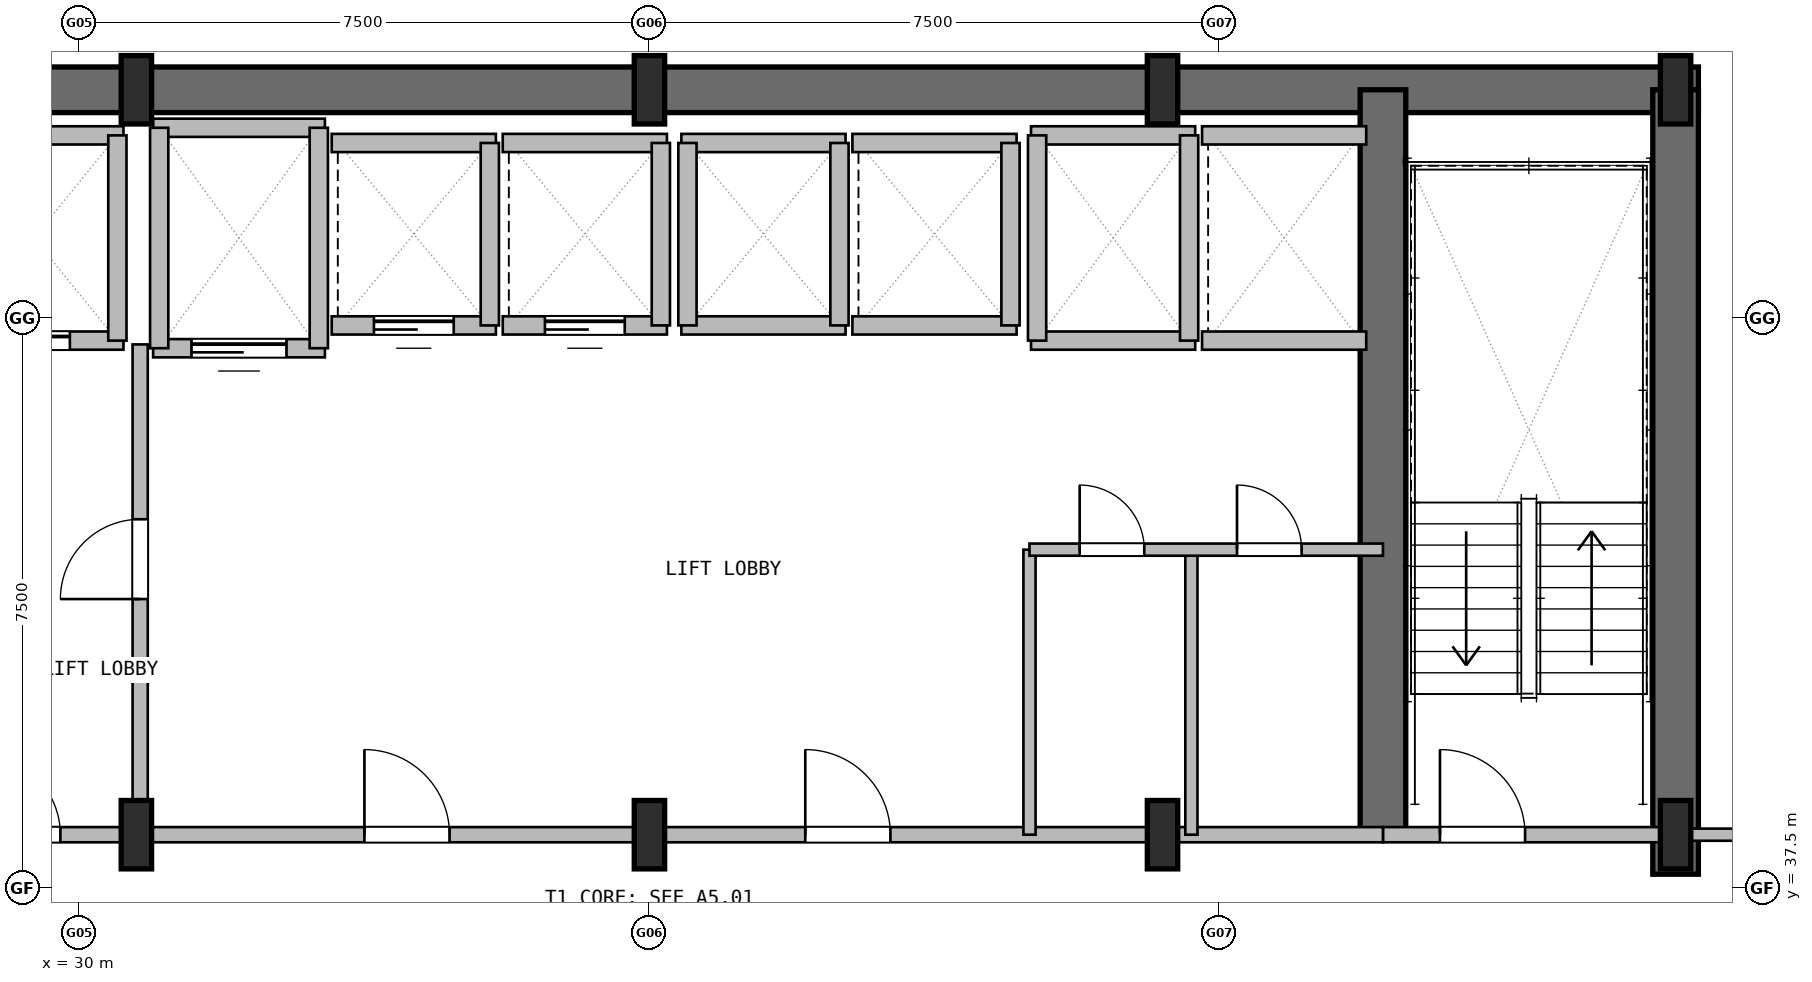
"""IFC4 building model, lengths in metres.
Left out: names, types, materials, properties, quantities, classifications, styles, units other than length and angle.
Written with IfcOpenShell. Run it as: python <this file> out.ifc"""

import sys

from ifc_helpers import new_model, si_unit, direction, frame, frame_2d, origin, origin_2d, place, context, subcontext, project, spatial, rectangle, i_section, extrude, element, fill, save


model = new_model("IFC4")
c1 = context("Model", 3, precision=1e-05, world=origin(), true_north=direction((0.0, 1.0)))
c2 = subcontext(c1, "Body", "Model", "MODEL_VIEW")
j1 = project(units=[si_unit("LENGTHUNIT", "METRE"), si_unit("PLANEANGLEUNIT", "RADIAN")], contexts=[c1])
p1 = place(None, origin())
s1 = spatial("IfcSite", under=j1, at=p1, CompositionType="ELEMENT")
p2 = place(p1, origin())
s2 = spatial("IfcBuilding", under=s1, at=p2, CompositionType="ELEMENT")
p3 = place(p2, frame((0.0, 0.0, 57.0)))
s3 = spatial("IfcBuildingStorey", under=s2, at=p3, CompositionType="ELEMENT", Elevation=57.0)
p4 = place(p3, frame((23.7, 48.0, 0.0), z_axis=(0.0, 0.0, 1.0), x_axis=(1.0, 0.0, 0.0)))
e1 = element("IfcWall", 1, at=p4, inside=s3, PredefinedType="SHEAR", context=c2, shape_type="SweptSolid", body=[
    extrude(rectangle(XDim=27.6, YDim=0.6, at=frame_2d((13.8, 0.0))), origin(), (0.0, 0.0, 1.0), 3.3),
])
p5 = place(p3, frame((51.0, 37.68, 0.0), z_axis=(0.0, 0.0, 1.0), x_axis=(0.0, 1.0, 0.0)))
e2 = element("IfcWall", 2, at=p5, inside=s3, PredefinedType="SHEAR", context=c2, shape_type="SweptSolid", body=[
    extrude(rectangle(XDim=10.32, YDim=0.6, at=frame_2d((5.16, 0.0))), origin(), (0.0, 0.0, 1.0), 3.3),
])
p6 = place(p3, frame((47.15, 38.2, 0.0), z_axis=(0.0, 0.0, 1.0), x_axis=(0.0, 1.0, 0.0)))
e3 = element("IfcWall", 3, at=p6, inside=s3, PredefinedType="SHEAR", context=c2, shape_type="SweptSolid", body=[
    extrude(rectangle(XDim=9.8, YDim=0.6, at=frame_2d((4.9, 0.0))), origin(), (0.0, 0.0, 1.0), 3.3),
])
for number, where, z_axis, x_axis in (
    (4, (30.75, 38.2, 0.0), (0.0, 0.0, 1.0), (1.0, 0.0, 0.0)),
    (5, (30.75, 48.0, 0.0), (0.0, 0.0, 1.0), (1.0, 0.0, 0.0)),
    (6, (37.5, 38.2, 0.0), (0.0, 0.0, 1.0), (1.0, 0.0, 0.0)),
    (7, (37.5, 48.0, 0.0), (0.0, 0.0, 1.0), (1.0, 0.0, 0.0)),
    (8, (44.25, 38.2, 0.0), (0.0, 0.0, 1.0), (1.0, 0.0, 0.0)),
    (9, (44.25, 48.0, 0.0), (0.0, 0.0, 1.0), (1.0, 0.0, 0.0)),
    (10, (51.0, 38.2, 0.0), (0.0, 0.0, 1.0), (1.0, 0.0, 0.0)),
    (11, (51.0, 48.0, 0.0), (0.0, 0.0, 1.0), (1.0, 0.0, 0.0)),
):
    element("IfcColumn", number, at=place(p3, frame(where, z_axis=z_axis, x_axis=x_axis)), inside=s3, PredefinedType="COLUMN", context=c2, shape_type="SweptSolid", body=[
        extrude(i_section(OverallWidth=0.4, OverallDepth=0.9, WebThickness=0.02, FlangeThickness=0.036, at=origin_2d()), origin(), (0.0, 0.0, 1.0), 3.3),
    ])
p7 = place(p3, frame((47.15, 38.2, 0.0), z_axis=(0.0, 0.0, 1.0), x_axis=(1.0, 0.0, 0.0)))
e12 = element("IfcWall", 12, at=p7, inside=s3, PredefinedType="PARTITIONING", context=c2, shape_type="SweptSolid", body=[
    extrude(rectangle(XDim=3.85, YDim=0.2, at=frame_2d((1.925, 0.0))), origin(), (0.0, 0.0, 1.0), 2.33),
])
p8 = place(p7, frame((0.75, 0.0, 0.0)))
e13 = element("IfcOpeningElement", 13, at=p8, cuts=e12, PredefinedType="OPENING", context=c2, shape_type="SweptSolid", body=[
    extrude(rectangle(XDim=1.12, YDim=2.1, at=frame_2d((0.56, 1.05))), frame((0.0, 0.11, 0.0), z_axis=(0.0, -1.0, 0.0), x_axis=(1.0, 0.0, 0.0)), (0.0, 0.0, 1.0), 0.22),
])
p9 = place(p3, frame((30.8, 38.2, 0.0), z_axis=(0.0, 0.0, 1.0), x_axis=(0.0, 1.0, 0.0)))
e14 = element("IfcWall", 14, at=p9, inside=s3, PredefinedType="PARTITIONING", context=c2, shape_type="SweptSolid", body=[
    extrude(rectangle(XDim=6.45, YDim=0.2, at=frame_2d((3.225, 0.0))), origin(), (0.0, 0.0, 1.0), 2.33),
])
p10 = place(p9, frame((3.1, 0.0, 0.0)))
e15 = element("IfcOpeningElement", 15, at=p10, cuts=e14, PredefinedType="OPENING", context=c2, shape_type="SweptSolid", body=[
    extrude(rectangle(XDim=1.05, YDim=2.1, at=frame_2d((0.525, 1.05))), frame((0.0, 0.11, 0.0), z_axis=(0.0, -1.0, 0.0), x_axis=(1.0, 0.0, 0.0)), (0.0, 0.0, 1.0), 0.22),
])
p11 = place(p3, frame((27.95, 38.2, 0.0), z_axis=(0.0, 0.0, 1.0), x_axis=(1.0, 0.0, 0.0)))
e16 = element("IfcWall", 16, at=p11, inside=s3, PredefinedType="PARTITIONING", context=c2, shape_type="SweptSolid", body=[
    extrude(rectangle(XDim=2.85, YDim=0.2, at=frame_2d((1.425, 0.0))), origin(), (0.0, 0.0, 1.0), 2.33),
])
p12 = place(p11, frame((0.75, 0.0, 0.0)))
e17 = element("IfcOpeningElement", 17, at=p12, cuts=e16, PredefinedType="OPENING", context=c2, shape_type="SweptSolid", body=[
    extrude(rectangle(XDim=1.05, YDim=2.1, at=frame_2d((0.525, 1.05))), frame((0.0, 0.11, 0.0), z_axis=(0.0, -1.0, 0.0), x_axis=(1.0, 0.0, 0.0)), (0.0, 0.0, 1.0), 0.22),
])
p13 = place(p3, frame((30.8, 38.2, 0.0), z_axis=(0.0, 0.0, 1.0), x_axis=(1.0, 0.0, 0.0)))
e18 = element("IfcWall", 18, at=p13, inside=s3, PredefinedType="PARTITIONING", context=c2, shape_type="SweptSolid", body=[
    extrude(rectangle(XDim=16.35, YDim=0.2, at=frame_2d((8.175, 0.0))), origin(), (0.0, 0.0, 1.0), 2.33),
])
p14 = place(p13, frame((2.95, 0.0, 0.0)))
e19 = element("IfcOpeningElement", 19, at=p14, cuts=e18, PredefinedType="OPENING", context=c2, shape_type="SweptSolid", body=[
    extrude(rectangle(XDim=1.12, YDim=2.1, at=frame_2d((0.56, 1.05))), frame((0.0, 0.11, 0.0), z_axis=(0.0, -1.0, 0.0), x_axis=(1.0, 0.0, 0.0)), (0.0, 0.0, 1.0), 0.22),
])
p15 = place(p13, frame((8.75, 0.0, 0.0)))
e20 = element("IfcOpeningElement", 20, at=p15, cuts=e18, PredefinedType="OPENING", context=c2, shape_type="SweptSolid", body=[
    extrude(rectangle(XDim=1.12, YDim=2.1, at=frame_2d((0.56, 1.05))), frame((0.0, 0.11, 0.0), z_axis=(0.0, -1.0, 0.0), x_axis=(1.0, 0.0, 0.0)), (0.0, 0.0, 1.0), 0.22),
])
p16 = place(p3, frame((28.22, 44.7, 0.0), z_axis=(0.0, 0.0, 1.0), x_axis=(1.0, 0.0, 0.0)))
e21 = element("IfcWall", 21, at=p16, inside=s3, PredefinedType="PARTITIONING", context=c2, shape_type="SweptSolid", body=[
    extrude(rectangle(XDim=2.36, YDim=0.24, at=frame_2d((1.18, 0.0))), origin(), (0.0, 0.0, 1.0), 3.03),
])
p17 = place(p16, frame((0.705, 0.0, 0.0)))
e22 = element("IfcOpeningElement", 22, at=p17, cuts=e21, PredefinedType="OPENING", context=c2, shape_type="SweptSolid", body=[
    extrude(rectangle(XDim=0.95, YDim=2.15, at=frame_2d((0.475, 1.075))), frame((0.0, 0.13, 0.0), z_axis=(0.0, -1.0, 0.0), x_axis=(1.0, 0.0, 0.0)), (0.0, 0.0, 1.0), 0.26),
])
p18 = place(p3, frame((28.22, 47.4, 0.0), z_axis=(0.0, 0.0, 1.0), x_axis=(1.0, 0.0, 0.0)))
e23 = element("IfcWall", 23, at=p18, inside=s3, PredefinedType="PARTITIONING", context=c2, shape_type="SweptSolid", body=[
    extrude(rectangle(XDim=2.36, YDim=0.24, at=frame_2d((1.18, 0.0))), origin(), (0.0, 0.0, 1.0), 3.03),
])
p19 = place(p3, frame((30.5, 44.7, 0.0), z_axis=(0.0, 0.0, 1.0), x_axis=(0.0, 1.0, 0.0)))
e24 = element("IfcWall", 24, at=p19, inside=s3, PredefinedType="PARTITIONING", context=c2, shape_type="SweptSolid", body=[
    extrude(rectangle(XDim=2.7, YDim=0.24, at=frame_2d((1.35, 0.0))), origin(), (0.0, 0.0, 1.0), 2.33),
])
p20 = place(p3, frame((30.97, 44.6, 0.0), z_axis=(0.0, 0.0, 1.0), x_axis=(1.0, 0.0, 0.0)))
e25 = element("IfcWall", 25, at=p20, inside=s3, PredefinedType="PARTITIONING", context=c2, shape_type="SweptSolid", body=[
    extrude(rectangle(XDim=2.26, YDim=0.24, at=frame_2d((1.13, 0.0))), origin(), (0.0, 0.0, 1.0), 3.03),
])
p21 = place(p20, frame((0.505, 0.0, 0.0)))
e26 = element("IfcOpeningElement", 26, at=p21, cuts=e25, PredefinedType="OPENING", context=c2, shape_type="SweptSolid", body=[
    extrude(rectangle(XDim=1.25, YDim=2.2, at=frame_2d((0.625, 1.1))), frame((0.0, 0.13, 0.0), z_axis=(0.0, -1.0, 0.0), x_axis=(1.0, 0.0, 0.0)), (0.0, 0.0, 1.0), 0.26),
])
p22 = place(p3, frame((30.97, 47.5, 0.0), z_axis=(0.0, 0.0, 1.0), x_axis=(1.0, 0.0, 0.0)))
e27 = element("IfcWall", 27, at=p22, inside=s3, PredefinedType="PARTITIONING", context=c2, shape_type="SweptSolid", body=[
    extrude(rectangle(XDim=2.26, YDim=0.24, at=frame_2d((1.13, 0.0))), origin(), (0.0, 0.0, 1.0), 3.03),
])
for number, where, z_axis, x_axis in (
    (28, (31.05, 44.6, 0.0), (0.0, 0.0, 1.0), (0.0, 1.0, 0.0)),
    (29, (33.15, 44.6, 0.0), (0.0, 0.0, 1.0), (0.0, 1.0, 0.0)),
):
    element("IfcWall", number, at=place(p3, frame(where, z_axis=z_axis, x_axis=x_axis)), inside=s3, PredefinedType="PARTITIONING", context=c2, shape_type="SweptSolid", body=[
        extrude(rectangle(XDim=2.9, YDim=0.24, at=frame_2d((1.45, 0.0))), origin(), (0.0, 0.0, 1.0), 3.03),
    ])
p23 = place(p3, frame((33.32, 44.9, 0.0), z_axis=(0.0, 0.0, 1.0), x_axis=(1.0, 0.0, 0.0)))
e30 = element("IfcWall", 30, at=p23, inside=s3, PredefinedType="PARTITIONING", context=c2, shape_type="SweptSolid", body=[
    extrude(rectangle(XDim=2.16, YDim=0.24, at=frame_2d((1.08, 0.0))), origin(), (0.0, 0.0, 1.0), 3.03),
])
p24 = place(p23, frame((0.555, 0.0, 0.0)))
e31 = element("IfcOpeningElement", 31, at=p24, cuts=e30, PredefinedType="OPENING", context=c2, shape_type="SweptSolid", body=[
    extrude(rectangle(XDim=1.05, YDim=2.15, at=frame_2d((0.525, 1.075))), frame((0.0, 0.13, 0.0), z_axis=(0.0, -1.0, 0.0), x_axis=(1.0, 0.0, 0.0)), (0.0, 0.0, 1.0), 0.26),
])
p25 = place(p3, frame((33.32, 47.3, 0.0), z_axis=(0.0, 0.0, 1.0), x_axis=(1.0, 0.0, 0.0)))
e32 = element("IfcWall", 32, at=p25, inside=s3, PredefinedType="PARTITIONING", context=c2, shape_type="SweptSolid", body=[
    extrude(rectangle(XDim=2.16, YDim=0.24, at=frame_2d((1.08, 0.0))), origin(), (0.0, 0.0, 1.0), 3.03),
])
p26 = place(p3, frame((35.4, 44.9, 0.0), z_axis=(0.0, 0.0, 1.0), x_axis=(0.0, 1.0, 0.0)))
e33 = element("IfcWall", 33, at=p26, inside=s3, PredefinedType="PARTITIONING", context=c2, shape_type="SweptSolid", body=[
    extrude(rectangle(XDim=2.4, YDim=0.24, at=frame_2d((1.2, 0.0))), origin(), (0.0, 0.0, 1.0), 3.03),
])
p27 = place(p3, frame((35.57, 44.9, 0.0), z_axis=(0.0, 0.0, 1.0), x_axis=(1.0, 0.0, 0.0)))
e34 = element("IfcWall", 34, at=p27, inside=s3, PredefinedType="PARTITIONING", context=c2, shape_type="SweptSolid", body=[
    extrude(rectangle(XDim=2.16, YDim=0.24, at=frame_2d((1.08, 0.0))), origin(), (0.0, 0.0, 1.0), 3.03),
])
p28 = place(p27, frame((0.555, 0.0, 0.0)))
e35 = element("IfcOpeningElement", 35, at=p28, cuts=e34, PredefinedType="OPENING", context=c2, shape_type="SweptSolid", body=[
    extrude(rectangle(XDim=1.05, YDim=2.15, at=frame_2d((0.525, 1.075))), frame((0.0, 0.13, 0.0), z_axis=(0.0, -1.0, 0.0), x_axis=(1.0, 0.0, 0.0)), (0.0, 0.0, 1.0), 0.26),
])
p29 = place(p3, frame((35.57, 47.3, 0.0), z_axis=(0.0, 0.0, 1.0), x_axis=(1.0, 0.0, 0.0)))
e36 = element("IfcWall", 36, at=p29, inside=s3, PredefinedType="PARTITIONING", context=c2, shape_type="SweptSolid", body=[
    extrude(rectangle(XDim=2.16, YDim=0.24, at=frame_2d((1.08, 0.0))), origin(), (0.0, 0.0, 1.0), 3.03),
])
p30 = place(p3, frame((37.65, 44.9, 0.0), z_axis=(0.0, 0.0, 1.0), x_axis=(0.0, 1.0, 0.0)))
e37 = element("IfcWall", 37, at=p30, inside=s3, PredefinedType="PARTITIONING", context=c2, shape_type="SweptSolid", body=[
    extrude(rectangle(XDim=2.4, YDim=0.24, at=frame_2d((1.2, 0.0))), origin(), (0.0, 0.0, 1.0), 3.03),
])
for number, where, z_axis, x_axis in (
    (38, (37.92, 44.9, 0.0), (0.0, 0.0, 1.0), (1.0, 0.0, 0.0)),
    (39, (37.92, 47.3, 0.0), (0.0, 0.0, 1.0), (1.0, 0.0, 0.0)),
):
    element("IfcWall", number, at=place(p3, frame(where, z_axis=z_axis, x_axis=x_axis)), inside=s3, PredefinedType="PARTITIONING", context=c2, shape_type="SweptSolid", body=[
        extrude(rectangle(XDim=2.16, YDim=0.24, at=frame_2d((1.08, 0.0))), origin(), (0.0, 0.0, 1.0), 3.03),
    ])
for number, where, z_axis, x_axis in (
    (40, (38.0, 44.9, 0.0), (0.0, 0.0, 1.0), (0.0, 1.0, 0.0)),
    (41, (40.0, 44.9, 0.0), (0.0, 0.0, 1.0), (0.0, 1.0, 0.0)),
):
    element("IfcWall", number, at=place(p3, frame(where, z_axis=z_axis, x_axis=x_axis)), inside=s3, PredefinedType="PARTITIONING", context=c2, shape_type="SweptSolid", body=[
        extrude(rectangle(XDim=2.4, YDim=0.24, at=frame_2d((1.2, 0.0))), origin(), (0.0, 0.0, 1.0), 3.03),
    ])
for number, where, z_axis, x_axis in (
    (42, (40.17, 44.9, 0.0), (0.0, 0.0, 1.0), (1.0, 0.0, 0.0)),
    (43, (40.17, 47.3, 0.0), (0.0, 0.0, 1.0), (1.0, 0.0, 0.0)),
):
    element("IfcWall", number, at=place(p3, frame(where, z_axis=z_axis, x_axis=x_axis)), inside=s3, PredefinedType="PARTITIONING", context=c2, shape_type="SweptSolid", body=[
        extrude(rectangle(XDim=2.16, YDim=0.24, at=frame_2d((1.08, 0.0))), origin(), (0.0, 0.0, 1.0), 3.03),
    ])
p31 = place(p3, frame((42.25, 44.9, 0.0), z_axis=(0.0, 0.0, 1.0), x_axis=(0.0, 1.0, 0.0)))
e44 = element("IfcWall", 44, at=p31, inside=s3, PredefinedType="PARTITIONING", context=c2, shape_type="SweptSolid", body=[
    extrude(rectangle(XDim=2.4, YDim=0.24, at=frame_2d((1.2, 0.0))), origin(), (0.0, 0.0, 1.0), 3.03),
])
for number, where, z_axis, x_axis in (
    (45, (42.52, 44.7, 0.0), (0.0, 0.0, 1.0), (1.0, 0.0, 0.0)),
    (46, (42.52, 47.4, 0.0), (0.0, 0.0, 1.0), (1.0, 0.0, 0.0)),
):
    element("IfcWall", number, at=place(p3, frame(where, z_axis=z_axis, x_axis=x_axis)), inside=s3, PredefinedType="PARTITIONING", context=c2, shape_type="SweptSolid", body=[
        extrude(rectangle(XDim=2.16, YDim=0.24, at=frame_2d((1.08, 0.0))), origin(), (0.0, 0.0, 1.0), 3.03),
    ])
for number, where, z_axis, x_axis in (
    (47, (42.6, 44.7, 0.0), (0.0, 0.0, 1.0), (0.0, 1.0, 0.0)),
    (48, (44.6, 44.7, 0.0), (0.0, 0.0, 1.0), (0.0, 1.0, 0.0)),
):
    element("IfcWall", number, at=place(p3, frame(where, z_axis=z_axis, x_axis=x_axis)), inside=s3, PredefinedType="PARTITIONING", context=c2, shape_type="SweptSolid", body=[
        extrude(rectangle(XDim=2.7, YDim=0.24, at=frame_2d((1.35, 0.0))), origin(), (0.0, 0.0, 1.0), 3.03),
    ])
for number, where, z_axis, x_axis in (
    (49, (44.77, 44.7, 0.0), (0.0, 0.0, 1.0), (1.0, 0.0, 0.0)),
    (50, (44.77, 47.4, 0.0), (0.0, 0.0, 1.0), (1.0, 0.0, 0.0)),
):
    element("IfcWall", number, at=place(p3, frame(where, z_axis=z_axis, x_axis=x_axis)), inside=s3, PredefinedType="PARTITIONING", context=c2, shape_type="SweptSolid", body=[
        extrude(rectangle(XDim=2.16, YDim=0.24, at=frame_2d((1.08, 0.0))), origin(), (0.0, 0.0, 1.0), 3.03),
    ])
for number, where, z_axis, x_axis in (
    (51, (42.5, 38.2, 0.0), (0.0, 0.0, 1.0), (0.0, 1.0, 0.0)),
    (52, (44.63, 38.2, 0.0), (0.0, 0.0, 1.0), (0.0, 1.0, 0.0)),
):
    element("IfcWall", number, at=place(p3, frame(where, z_axis=z_axis, x_axis=x_axis)), inside=s3, PredefinedType="PARTITIONING", context=c2, shape_type="SweptSolid", body=[
        extrude(rectangle(XDim=3.75, YDim=0.16, at=frame_2d((1.875, 0.0))), origin(), (0.0, 0.0, 1.0), 3.03),
    ])
p32 = place(p3, frame((42.5, 41.95, 0.0), z_axis=(0.0, 0.0, 1.0), x_axis=(1.0, 0.0, 0.0)))
e53 = element("IfcWall", 53, at=p32, inside=s3, PredefinedType="PARTITIONING", context=c2, shape_type="SweptSolid", body=[
    extrude(rectangle(XDim=4.65, YDim=0.16, at=frame_2d((2.325, 0.0))), origin(), (0.0, 0.0, 1.0), 3.03),
])
p33 = place(p32, frame((0.66, 0.0, 0.0)))
e54 = element("IfcOpeningElement", 54, at=p33, cuts=e53, PredefinedType="OPENING", context=c2, shape_type="SweptSolid", body=[
    extrude(rectangle(XDim=0.85, YDim=2.05, at=frame_2d((0.425, 1.025))), frame((0.0, 0.09, 0.0), z_axis=(0.0, -1.0, 0.0), x_axis=(1.0, 0.0, 0.0)), (0.0, 0.0, 1.0), 0.18),
])
p34 = place(p32, frame((2.73, 0.0, 0.0)))
e55 = element("IfcOpeningElement", 55, at=p34, cuts=e53, PredefinedType="OPENING", context=c2, shape_type="SweptSolid", body=[
    extrude(rectangle(XDim=0.85, YDim=2.05, at=frame_2d((0.425, 1.025))), frame((0.0, 0.09, 0.0), z_axis=(0.0, -1.0, 0.0), x_axis=(1.0, 0.0, 0.0)), (0.0, 0.0, 1.0), 0.18),
])
p35 = place(p3, frame((51.0, 38.2, 0.0), z_axis=(0.0, 0.0, 1.0), x_axis=(1.0, 0.0, 0.0)))
e56 = element("IfcWall", 56, at=p35, inside=s3, PredefinedType="PARTITIONING", context=c2, shape_type="SweptSolid", body=[
    extrude(rectangle(XDim=7.65, YDim=0.16, at=frame_2d((3.825, 0.0))), origin(), (0.0, 0.0, 1.0), 2.33),
])
p36 = place(p8, origin())
e57 = element("IfcDoor", 57, at=p36, inside=s3, OperationType="SINGLE_SWING_RIGHT", PredefinedType="DOOR", context=c2, shape_type="SweptSolid", body=[
    extrude(rectangle(XDim=1.12, YDim=2.1, at=frame_2d((0.56, 1.05))), frame((0.0, 0.025, 0.0), z_axis=(0.0, -1.0, 0.0), x_axis=(1.0, 0.0, 0.0)), (0.0, 0.0, 1.0), 0.05),
])
fill(e13, e57)
p37 = place(p10, origin())
e58 = element("IfcDoor", 58, at=p37, inside=s3, OperationType="SINGLE_SWING_LEFT", PredefinedType="DOOR", context=c2, shape_type="SweptSolid", body=[
    extrude(rectangle(XDim=1.05, YDim=2.1, at=frame_2d((0.525, 1.05))), frame((0.0, 0.025, 0.0), z_axis=(0.0, -1.0, 0.0), x_axis=(1.0, 0.0, 0.0)), (0.0, 0.0, 1.0), 0.05),
])
fill(e15, e58)
p38 = place(p12, origin())
e59 = element("IfcDoor", 59, at=p38, inside=s3, OperationType="SINGLE_SWING_RIGHT", PredefinedType="DOOR", context=c2, shape_type="SweptSolid", body=[
    extrude(rectangle(XDim=1.05, YDim=2.1, at=frame_2d((0.525, 1.05))), frame((0.0, 0.025, 0.0), z_axis=(0.0, -1.0, 0.0), x_axis=(1.0, 0.0, 0.0)), (0.0, 0.0, 1.0), 0.05),
])
fill(e17, e59)
p39 = place(p14, origin())
e60 = element("IfcDoor", 60, at=p39, inside=s3, OperationType="SINGLE_SWING_LEFT", PredefinedType="DOOR", context=c2, shape_type="SweptSolid", body=[
    extrude(rectangle(XDim=1.12, YDim=2.1, at=frame_2d((0.56, 1.05))), frame((0.0, 0.025, 0.0), z_axis=(0.0, -1.0, 0.0), x_axis=(1.0, 0.0, 0.0)), (0.0, 0.0, 1.0), 0.05),
])
fill(e19, e60)
p40 = place(p15, origin())
e61 = element("IfcDoor", 61, at=p40, inside=s3, OperationType="SINGLE_SWING_RIGHT", PredefinedType="DOOR", context=c2, shape_type="SweptSolid", body=[
    extrude(rectangle(XDim=1.12, YDim=2.1, at=frame_2d((0.56, 1.05))), frame((0.0, 0.025, 0.0), z_axis=(0.0, -1.0, 0.0), x_axis=(1.0, 0.0, 0.0)), (0.0, 0.0, 1.0), 0.05),
])
fill(e20, e61)
p41 = place(p17, origin())
e62 = element("IfcDoor", 62, at=p41, inside=s3, OperationType="SLIDING_TO_LEFT", PredefinedType="DOOR", context=c2, shape_type="SweptSolid", body=[
    extrude(rectangle(XDim=0.95, YDim=2.15, at=frame_2d((0.475, 1.075))), frame((0.0, 0.025, 0.0), z_axis=(0.0, -1.0, 0.0), x_axis=(1.0, 0.0, 0.0)), (0.0, 0.0, 1.0), 0.05),
])
fill(e22, e62)
p42 = place(p21, origin())
e63 = element("IfcDoor", 63, at=p42, inside=s3, OperationType="SLIDING_TO_LEFT", PredefinedType="DOOR", context=c2, shape_type="SweptSolid", body=[
    extrude(rectangle(XDim=1.25, YDim=2.2, at=frame_2d((0.625, 1.1))), frame((0.0, 0.025, 0.0), z_axis=(0.0, -1.0, 0.0), x_axis=(1.0, 0.0, 0.0)), (0.0, 0.0, 1.0), 0.05),
])
fill(e26, e63)
p43 = place(p24, origin())
e64 = element("IfcDoor", 64, at=p43, inside=s3, OperationType="SLIDING_TO_LEFT", PredefinedType="DOOR", context=c2, shape_type="SweptSolid", body=[
    extrude(rectangle(XDim=1.05, YDim=2.15, at=frame_2d((0.525, 1.075))), frame((0.0, 0.025, 0.0), z_axis=(0.0, -1.0, 0.0), x_axis=(1.0, 0.0, 0.0)), (0.0, 0.0, 1.0), 0.05),
])
fill(e31, e64)
p44 = place(p28, origin())
e65 = element("IfcDoor", 65, at=p44, inside=s3, OperationType="SLIDING_TO_LEFT", PredefinedType="DOOR", context=c2, shape_type="SweptSolid", body=[
    extrude(rectangle(XDim=1.05, YDim=2.15, at=frame_2d((0.525, 1.075))), frame((0.0, 0.025, 0.0), z_axis=(0.0, -1.0, 0.0), x_axis=(1.0, 0.0, 0.0)), (0.0, 0.0, 1.0), 0.05),
])
fill(e35, e65)
p45 = place(p33, origin())
e66 = element("IfcDoor", 66, at=p45, inside=s3, OperationType="SINGLE_SWING_RIGHT", PredefinedType="DOOR", context=c2, shape_type="SweptSolid", body=[
    extrude(rectangle(XDim=0.85, YDim=2.05, at=frame_2d((0.425, 1.025))), frame((0.0, 0.025, 0.0), z_axis=(0.0, -1.0, 0.0), x_axis=(1.0, 0.0, 0.0)), (0.0, 0.0, 1.0), 0.05),
])
fill(e54, e66)
p46 = place(p34, origin())
e67 = element("IfcDoor", 67, at=p46, inside=s3, OperationType="SINGLE_SWING_LEFT", PredefinedType="DOOR", context=c2, shape_type="SweptSolid", body=[
    extrude(rectangle(XDim=0.85, YDim=2.05, at=frame_2d((0.425, 1.025))), frame((0.0, 0.025, 0.0), z_axis=(0.0, -1.0, 0.0), x_axis=(1.0, 0.0, 0.0)), (0.0, 0.0, 1.0), 0.05),
])
fill(e55, e67)
save(model, sys.argv[1])
